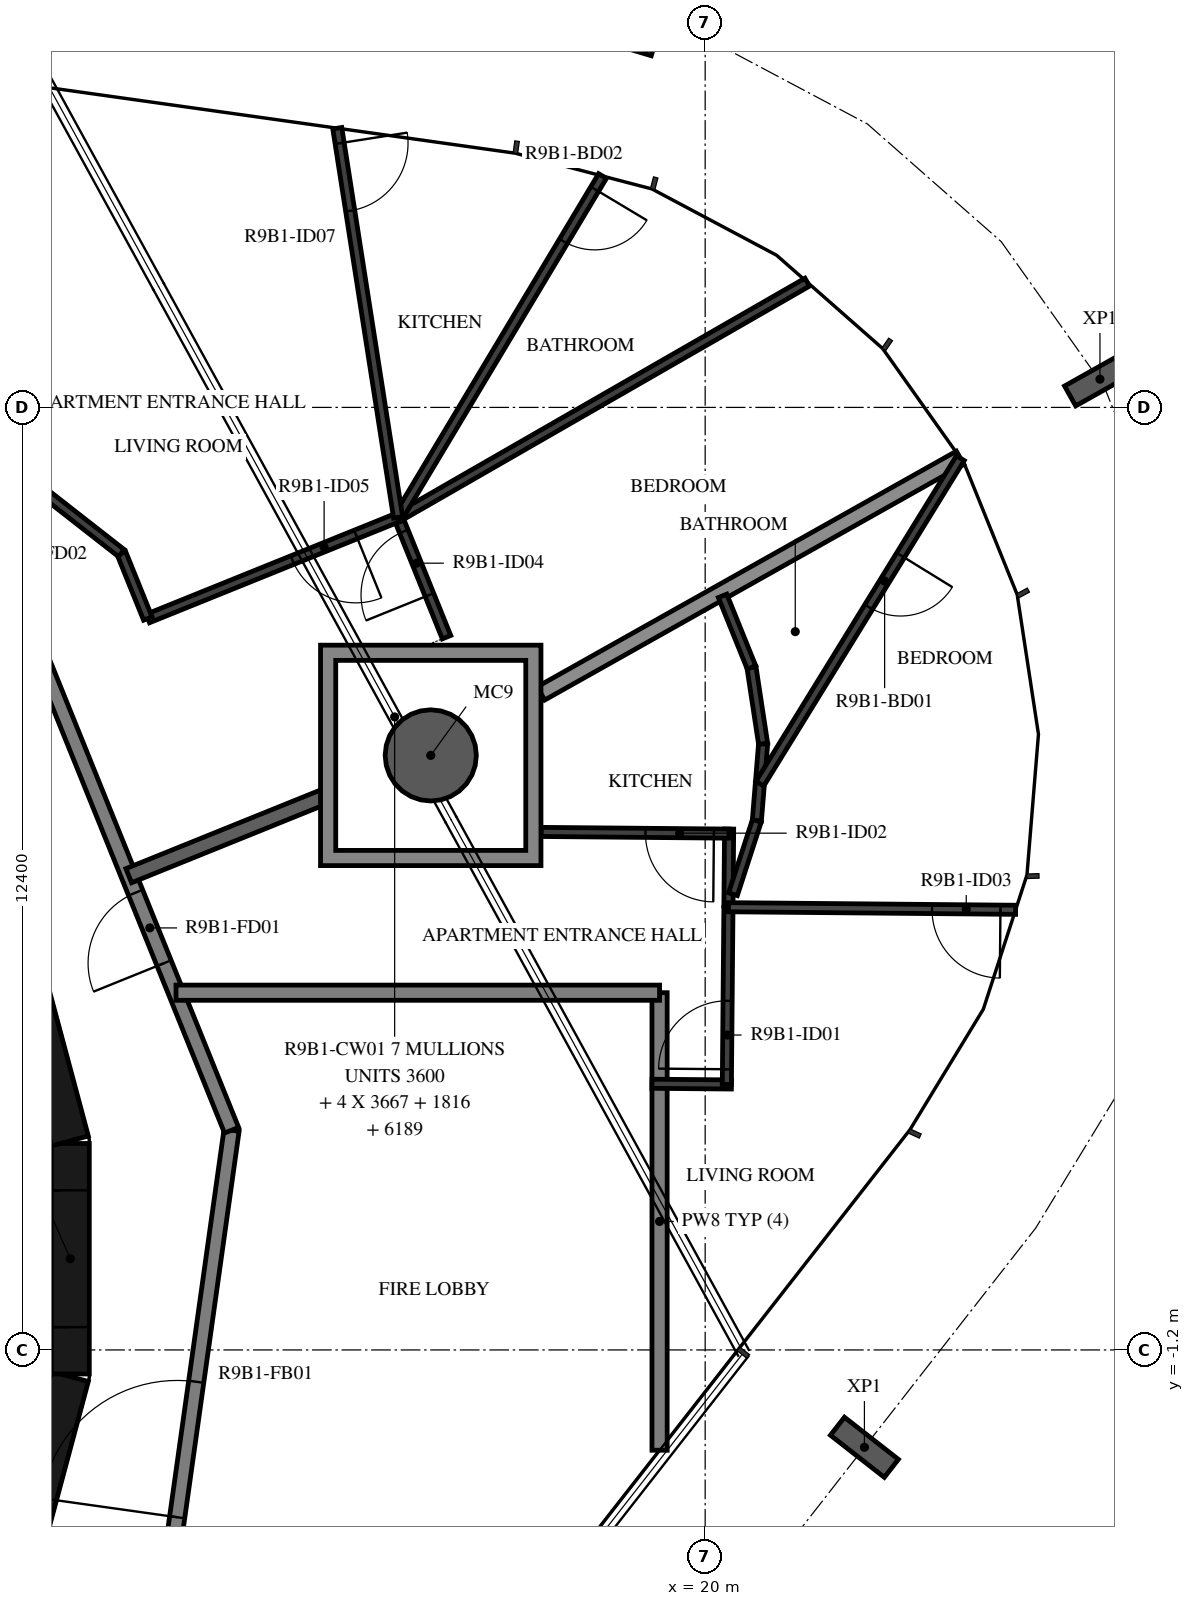
"""IFC4 building model, lengths in metres.
Left out: names, types, materials, properties, quantities, classifications, styles, units other than length and angle.
Written with IfcOpenShell. Run it as: python <this file> out.ifc"""

import sys

from ifc_helpers import new_model, si_unit, direction, frame, frame_2d, origin, origin_2d, place, context, subcontext, project, spatial, polyline, rectangle, hollow_circle, i_section, outline, extrude, element, fill, save


model = new_model("IFC4")
c1 = context("Model", 3, precision=1e-05, world=origin(), true_north=direction((0.0, 1.0)))
c2 = subcontext(c1, "Body", "Model", "MODEL_VIEW")
j1 = project(units=[si_unit("LENGTHUNIT", "METRE"), si_unit("PLANEANGLEUNIT", "RADIAN")], contexts=[c1])
p1 = place(None, origin())
s1 = spatial("IfcSite", under=j1, at=p1, CompositionType="ELEMENT")
p2 = place(p1, origin())
s2 = spatial("IfcBuilding", under=s1, at=p2, CompositionType="ELEMENT")
p3 = place(p2, frame((0.0, 0.0, 343.5)))
s3 = spatial("IfcBuildingStorey", under=s2, at=p3, CompositionType="ELEMENT", Elevation=343.5)
p4 = place(p3, frame((16.39, 6.622, -0.38), z_axis=(0.0, 0.0, 1.0), x_axis=(1.0, 0.0, 0.0)))
e1 = element("IfcColumn", 1, at=p4, inside=s3, PredefinedType="COLUMN", context=c2, shape_type="SweptSolid", body=[
    extrude(hollow_circle(Radius=0.6, WallThickness=0.03, at=origin_2d()), origin(), (0.0, 0.0, 1.0), 3.5),
])
for number, where, z_axis, x_axis in (
    (2, (22.095, -2.481, -0.38), (0.0, 0.0, 1.0), (-0.616, -0.788, 0.0)),
    (3, (25.194, 11.571, -0.38), (0.0, 0.0, 1.0), (0.49, -0.872, 0.0)),
    (4, (19.276, 16.301, -0.38), (0.0, 0.0, 1.0), (0.958, -0.286, 0.0)),
):
    element("IfcColumn", number, at=place(p3, frame(where, z_axis=z_axis, x_axis=x_axis)), inside=s3, PredefinedType="COLUMN", context=c2, shape_type="SweptSolid", body=[
        extrude(i_section(OverallWidth=0.3, OverallDepth=0.9, WebThickness=0.019, FlangeThickness=0.035, FilletRadius=0.03, at=origin_2d()), origin(), (0.0, 0.0, 1.0), 3.5),
    ])
p5 = place(p3, frame((10.858, -4.479, 0.0), z_axis=(0.0, 0.0, 1.0), x_axis=(0.258734743916, 0.965948410781, 0.0)))
e5 = element("IfcWall", 5, at=p5, inside=s3, PredefinedType="SHEAR", context=c2, shape_type="SweptSolid", body=[
    extrude(rectangle(XDim=3.033, YDim=0.5, at=frame_2d((1.516, 0.0))), origin(), (0.0, 0.0, 1.0), 3.12),
])
p6 = place(p3, frame((11.647, -1.516, 0.0), z_axis=(0.0, 0.0, 1.0), x_axis=(0.0, 1.0, 0.0)))
e6 = element("IfcWall", 6, at=p6, inside=s3, PredefinedType="SHEAR", context=c2, shape_type="SweptSolid", body=[
    extrude(rectangle(XDim=3.033, YDim=0.5, at=frame_2d((1.516, 0.0))), origin(), (0.0, 0.0, 1.0), 3.12),
])
p7 = place(p6, frame((0.616, 0.0, 0.0)))
e7 = element("IfcOpeningElement", 7, at=p7, cuts=e6, PredefinedType="OPENING", context=c2, shape_type="SweptSolid", body=[
    extrude(rectangle(XDim=1.8, YDim=2.1, at=frame_2d((0.9, 1.05))), frame((0.0, 0.26, 0.0), z_axis=(0.0, -1.0, 0.0), x_axis=(1.0, 0.0, 0.0)), (0.0, 0.0, 1.0), 0.52),
])
p8 = place(p3, frame((11.643, 1.55, 0.0), z_axis=(0.0, 0.0, 1.0), x_axis=(-0.258734743916, 0.965948410781, 0.0)))
e8 = element("IfcWall", 8, at=p8, inside=s3, PredefinedType="SHEAR", context=c2, shape_type="SweptSolid", body=[
    extrude(rectangle(XDim=3.033, YDim=0.5, at=frame_2d((1.516, 0.0))), origin(), (0.0, 0.0, 1.0), 3.12),
])
p9 = place(p3, frame((12.77, -5.42, 0.0), z_axis=(0.0, 0.0, 1.0), x_axis=(0.139155334385, 0.990270565508, 0.0)))
e9 = element("IfcWall", 9, at=p9, inside=s3, PredefinedType="STANDARD", context=c2, shape_type="SweptSolid", body=[
    extrude(rectangle(XDim=7.181, YDim=0.2, at=frame_2d((3.59, 0.0))), origin(), (0.0, 0.0, 1.0), 3.12),
])
p10 = place(p9, frame((2.039, 0.0, 0.0)))
e10 = element("IfcOpeningElement", 10, at=p10, cuts=e9, PredefinedType="OPENING", context=c2, shape_type="SweptSolid", body=[
    extrude(rectangle(XDim=1.8, YDim=2.1, at=frame_2d((0.9, 1.05))), frame((0.0, 0.11, 0.0), z_axis=(0.0, -1.0, 0.0), x_axis=(1.0, 0.0, 0.0)), (0.0, 0.0, 1.0), 0.22),
])
p11 = place(p3, frame((13.769, 1.691, 0.0), z_axis=(0.0, 0.0, 1.0), x_axis=(-0.374618189599, 0.92717916932, 0.0)))
e11 = element("IfcWall", 11, at=p11, inside=s3, PredefinedType="STANDARD", context=c2, shape_type="SweptSolid", body=[
    extrude(rectangle(XDim=7.181, YDim=0.2, at=frame_2d((3.591, 0.0))), origin(), (0.0, 0.0, 1.0), 3.12),
])
p12 = place(p11, frame((2.371, 0.0, 0.0)))
e12 = element("IfcOpeningElement", 12, at=p12, cuts=e11, PredefinedType="OPENING", context=c2, shape_type="SweptSolid", body=[
    extrude(rectangle(XDim=1.0, YDim=2.1, at=frame_2d((0.5, 1.05))), frame((0.0, 0.11, 0.0), z_axis=(0.0, -1.0, 0.0), x_axis=(1.0, 0.0, 0.0)), (0.0, 0.0, 1.0), 0.22),
])
p13 = place(p3, frame((19.4, -2.519, 0.0), z_axis=(0.0, 0.0, 1.0), x_axis=(0.0, 1.0, 0.0)))
e13 = element("IfcWall", 13, at=p13, inside=s3, PredefinedType="STANDARD", context=c2, shape_type="SweptSolid", body=[
    extrude(rectangle(XDim=6.019, YDim=0.2, at=frame_2d((3.01, 0.0))), origin(), (0.0, 0.0, 1.0), 3.12),
])
p14 = place(p3, frame((19.4, 3.5, 0.0), z_axis=(0.0, 0.0, 1.0), x_axis=(-1.0, 0.0, 0.0)))
e14 = element("IfcWall", 14, at=p14, inside=s3, PredefinedType="STANDARD", context=c2, shape_type="SweptSolid", body=[
    extrude(rectangle(XDim=6.362, YDim=0.2, at=frame_2d((3.181, 0.0))), origin(), (0.0, 0.0, 1.0), 3.12),
])
p15 = place(p3, frame((14.989, 6.079, 0.0), z_axis=(0.0, 0.0, 1.0), x_axis=(-0.927203056473, -0.374559063523, 0.0)))
e15 = element("IfcWall", 15, at=p15, inside=s3, PredefinedType="STANDARD", context=c2, shape_type="SweptSolid", body=[
    extrude(rectangle(XDim=2.775, YDim=0.2, at=frame_2d((1.387, 0.0))), origin(), (0.0, 0.0, 1.0), 3.12),
])
p16 = place(p3, frame((23.354, 10.537, 0.0), z_axis=(0.0, 0.0, 1.0), x_axis=(-0.871719790551, -0.490004700754, 0.0)))
e16 = element("IfcWall", 16, at=p16, inside=s3, PredefinedType="STANDARD", context=c2, shape_type="SweptSolid", body=[
    extrude(rectangle(XDim=6.326, YDim=0.2, at=frame_2d((3.163, 0.0))), origin(), (0.0, 0.0, 1.0), 2.73),
])
p17 = place(p3, frame((19.3, 2.302, 0.0), z_axis=(0.0, 0.0, 1.0), x_axis=(0.999958506341, -0.009109643015, 0.0)))
e17 = element("IfcWall", 17, at=p17, inside=s3, PredefinedType="PARTITIONING", context=c2, shape_type="SweptSolid", body=[
    extrude(rectangle(XDim=1.045, YDim=0.12, at=frame_2d((0.522, 0.0))), origin(), (0.0, 0.0, 1.0), 3.12),
])
p18 = place(p3, frame((20.285, 2.293, 0.0), z_axis=(0.0, 0.0, 1.0), x_axis=(0.008900171034, 0.999960392693, 0.0)))
e18 = element("IfcWall", 18, at=p18, inside=s3, PredefinedType="PARTITIONING", context=c2, shape_type="SweptSolid", body=[
    extrude(rectangle(XDim=2.332, YDim=0.12, at=frame_2d((1.166, 0.0))), origin(), (0.0, 0.0, 1.0), 3.12),
])
p19 = place(p18, frame((0.2, 0.0, 0.0)))
e19 = element("IfcOpeningElement", 19, at=p19, cuts=e18, PredefinedType="OPENING", context=c2, shape_type="SweptSolid", body=[
    extrude(rectangle(XDim=0.9, YDim=2.1, at=frame_2d((0.45, 1.05))), frame((0.0, 0.07, 0.0), z_axis=(0.0, -1.0, 0.0), x_axis=(1.0, 0.0, 0.0)), (0.0, 0.0, 1.0), 0.14),
])
p20 = place(p3, frame((20.306, 4.639, 0.0), z_axis=(0.0, 0.0, 1.0), x_axis=(0.008906724211, 0.999960334345, 0.0)))
e20 = element("IfcWall", 20, at=p20, inside=s3, PredefinedType="PARTITIONING", context=c2, shape_type="SweptSolid", body=[
    extrude(rectangle(XDim=1.014, YDim=0.12, at=frame_2d((0.507, 0.0))), origin(), (0.0, 0.0, 1.0), 3.12),
])
p21 = place(p3, frame((20.315, 5.593, 0.0), z_axis=(0.0, 0.0, 1.0), x_axis=(-0.999960597409, 0.008877140833, 0.0)))
e21 = element("IfcWall", 21, at=p21, inside=s3, PredefinedType="PARTITIONING", context=c2, shape_type="SweptSolid", body=[
    extrude(rectangle(XDim=2.475, YDim=0.12, at=frame_2d((1.238, 0.0))), origin(), (0.0, 0.0, 1.0), 3.12),
])
p22 = place(p21, frame((0.2, 0.0, 0.0)))
e22 = element("IfcOpeningElement", 22, at=p22, cuts=e21, PredefinedType="OPENING", context=c2, shape_type="SweptSolid", body=[
    extrude(rectangle(XDim=0.9, YDim=2.1, at=frame_2d((0.45, 1.05))), frame((0.0, 0.07, 0.0), z_axis=(0.0, -1.0, 0.0), x_axis=(1.0, 0.0, 0.0)), (0.0, 0.0, 1.0), 0.14),
])
p23 = place(p3, frame((24.085, 4.591, 0.0), z_axis=(0.0, 0.0, 1.0), x_axis=(-0.99996025077, 0.008916102255, 0.0)))
e23 = element("IfcWall", 23, at=p23, inside=s3, PredefinedType="PARTITIONING", context=c2, shape_type="SweptSolid", body=[
    extrude(rectangle(XDim=3.779, YDim=0.12, at=frame_2d((1.889, 0.0))), origin(), (0.0, 0.0, 1.0), 2.73),
])
p24 = place(p23, frame((0.2, 0.0, 0.0)))
e24 = element("IfcOpeningElement", 24, at=p24, cuts=e23, PredefinedType="OPENING", context=c2, shape_type="SweptSolid", body=[
    extrude(rectangle(XDim=0.9, YDim=2.1, at=frame_2d((0.45, 1.05))), frame((0.0, 0.07, 0.0), z_axis=(0.0, -1.0, 0.0), x_axis=(1.0, 0.0, 0.0)), (0.0, 0.0, 1.0), 0.14),
])
p25 = place(p3, frame((20.762, 6.775, 0.0), z_axis=(0.0, 0.0, 1.0), x_axis=(-0.08121587, -0.996696534789, 0.0)))
e25 = element("IfcWall", 25, at=p25, inside=s3, PredefinedType="PARTITIONING", context=c2, shape_type="SweptSolid", body=[
    extrude(rectangle(XDim=1.016, YDim=0.12, at=frame_2d((0.508, 0.0))), origin(), (0.0, 0.0, 1.0), 3.12),
])
p26 = place(p3, frame((20.68, 5.762, 0.0), z_axis=(0.0, 0.0, 1.0), x_axis=(-0.30908063779, -0.951035834942, 0.0)))
e26 = element("IfcWall", 26, at=p26, inside=s3, PredefinedType="PARTITIONING", context=c2, shape_type="SweptSolid", body=[
    extrude(rectangle(XDim=1.016, YDim=0.12, at=frame_2d((0.508, 0.0))), origin(), (0.0, 0.0, 1.0), 3.12),
])
p27 = place(p3, frame((23.357, 10.532, 0.0), z_axis=(0.0, 0.0, 1.0), x_axis=(-0.524476563806, -0.851424884542, 0.0)))
e27 = element("IfcWall", 27, at=p27, inside=s3, PredefinedType="PARTITIONING", context=c2, shape_type="SweptSolid", body=[
    extrude(rectangle(XDim=5.029, YDim=0.12, at=frame_2d((2.515, 0.0))), origin(), (0.0, 0.0, 1.0), 3.12),
])
p28 = place(p27, frame((1.5, 0.0, 0.0)))
e28 = element("IfcOpeningElement", 28, at=p28, cuts=e27, PredefinedType="OPENING", context=c2, shape_type="SweptSolid", body=[
    extrude(rectangle(XDim=0.8, YDim=2.1, at=frame_2d((0.4, 1.05))), frame((0.0, 0.07, 0.0), z_axis=(0.0, -1.0, 0.0), x_axis=(1.0, 0.0, 0.0)), (0.0, 0.0, 1.0), 0.14),
])
p29 = place(p3, frame((20.762, 6.775, 0.0), z_axis=(0.0, 0.0, 1.0), x_axis=(-0.150702440861, 0.988579169474, 0.0)))
e29 = element("IfcWall", 29, at=p29, inside=s3, PredefinedType="PARTITIONING", context=c2, shape_type="SweptSolid", body=[
    extrude(rectangle(XDim=1.016, YDim=0.12, at=frame_2d((0.508, 0.0))), origin(), (0.0, 0.0, 1.0), 3.12),
])
p30 = place(p3, frame((20.609, 7.779, 0.0), z_axis=(0.0, 0.0, 1.0), x_axis=(-0.374371668856, 0.927278735633, 0.0)))
e30 = element("IfcWall", 30, at=p30, inside=s3, PredefinedType="PARTITIONING", context=c2, shape_type="SweptSolid", body=[
    extrude(rectangle(XDim=1.016, YDim=0.12, at=frame_2d((0.508, 0.0))), origin(), (0.0, 0.0, 1.0), 3.12),
])
p31 = place(p3, frame((16.597, 8.177, 0.0), z_axis=(0.0, 0.0, 1.0), x_axis=(-0.374631609957, 0.927173746835, 0.0)))
e31 = element("IfcWall", 31, at=p31, inside=s3, PredefinedType="PARTITIONING", context=c2, shape_type="SweptSolid", body=[
    extrude(rectangle(XDim=1.7, YDim=0.12, at=frame_2d((0.85, 0.0))), origin(), (0.0, 0.0, 1.0), 3.12),
])
p32 = place(p31, frame((0.6, 0.0, 0.0)))
e32 = element("IfcOpeningElement", 32, at=p32, cuts=e31, PredefinedType="OPENING", context=c2, shape_type="SweptSolid", body=[
    extrude(rectangle(XDim=0.9, YDim=2.1, at=frame_2d((0.45, 1.05))), frame((0.0, 0.07, 0.0), z_axis=(0.0, -1.0, 0.0), x_axis=(1.0, 0.0, 0.0)), (0.0, 0.0, 1.0), 0.14),
])
p33 = place(p3, frame((15.96, 9.753, 0.0), z_axis=(0.0, 0.0, 1.0), x_axis=(-0.927148174805, -0.37469489182, 0.0)))
e33 = element("IfcWall", 33, at=p33, inside=s3, PredefinedType="PARTITIONING", context=c2, shape_type="SweptSolid", body=[
    extrude(rectangle(XDim=3.552, YDim=0.12, at=frame_2d((1.776, 0.0))), origin(), (0.0, 0.0, 1.0), 3.12),
])
p34 = place(p33, frame((0.6, 0.0, 0.0)))
e34 = element("IfcOpeningElement", 34, at=p34, cuts=e33, PredefinedType="OPENING", context=c2, shape_type="SweptSolid", body=[
    extrude(rectangle(XDim=0.9, YDim=2.1, at=frame_2d((0.45, 1.05))), frame((0.0, 0.07, 0.0), z_axis=(0.0, -1.0, 0.0), x_axis=(1.0, 0.0, 0.0)), (0.0, 0.0, 1.0), 0.14),
])
p35 = place(p3, frame((12.667, 8.423, 0.0), z_axis=(0.0, 0.0, 1.0), x_axis=(-0.374697807675, 0.927146996395, 0.0)))
e35 = element("IfcWall", 35, at=p35, inside=s3, PredefinedType="PARTITIONING", context=c2, shape_type="SweptSolid", body=[
    extrude(rectangle(XDim=0.928, YDim=0.12, at=frame_2d((0.464, 0.0))), origin(), (0.0, 0.0, 1.0), 3.12),
])
p36 = place(p3, frame((12.319, 9.283, 0.0), z_axis=(0.0, 0.0, 1.0), x_axis=(-0.788000268464, 0.61567489546, 0.0)))
e36 = element("IfcWall", 36, at=p36, inside=s3, PredefinedType="PARTITIONING", context=c2, shape_type="SweptSolid", body=[
    extrude(rectangle(XDim=7.985, YDim=0.12, at=frame_2d((3.992, 0.0))), origin(), (0.0, 0.0, 1.0), 3.12),
])
p37 = place(p36, frame((4.765, 0.0, 0.0)))
e37 = element("IfcOpeningElement", 37, at=p37, cuts=e36, PredefinedType="OPENING", context=c2, shape_type="SweptSolid", body=[
    extrude(rectangle(XDim=0.9, YDim=2.1, at=frame_2d((0.45, 1.05))), frame((0.0, 0.07, 0.0), z_axis=(0.0, -1.0, 0.0), x_axis=(1.0, 0.0, 0.0)), (0.0, 0.0, 1.0), 0.14),
])
p38 = place(p3, frame((21.343, 12.847, 0.0), z_axis=(0.0, 0.0, 1.0), x_axis=(-0.866974691568, -0.498352168832, 0.0)))
e38 = element("IfcWall", 38, at=p38, inside=s3, PredefinedType="PARTITIONING", context=c2, shape_type="SweptSolid", body=[
    extrude(rectangle(XDim=6.208, YDim=0.12, at=frame_2d((3.104, 0.0))), origin(), (0.0, 0.0, 1.0), 3.12),
])
p39 = place(p3, frame((18.649, 14.244, 0.0), z_axis=(0.0, 0.0, 1.0), x_axis=(-0.513782200586, -0.85792065505, 0.0)))
e39 = element("IfcWall", 39, at=p39, inside=s3, PredefinedType="PARTITIONING", context=c2, shape_type="SweptSolid", body=[
    extrude(rectangle(XDim=5.234, YDim=0.12, at=frame_2d((2.617, 0.0))), origin(), (0.0, 0.0, 1.0), 3.12),
])
p40 = place(p39, frame((0.2, 0.0, 0.0)))
e40 = element("IfcOpeningElement", 40, at=p40, cuts=e39, PredefinedType="OPENING", context=c2, shape_type="SweptSolid", body=[
    extrude(rectangle(XDim=0.8, YDim=2.1, at=frame_2d((0.4, 1.05))), frame((0.0, 0.07, 0.0), z_axis=(0.0, -1.0, 0.0), x_axis=(1.0, 0.0, 0.0)), (0.0, 0.0, 1.0), 0.14),
])
p41 = place(p3, frame((15.16, 14.873, 0.0), z_axis=(0.0, 0.0, 1.0), x_axis=(0.154389815045, -0.988010012606, 0.0)))
e41 = element("IfcWall", 41, at=p41, inside=s3, PredefinedType="PARTITIONING", context=c2, shape_type="SweptSolid", body=[
    extrude(rectangle(XDim=5.182, YDim=0.12, at=frame_2d((2.591, 0.0))), origin(), (0.0, 0.0, 1.0), 3.12),
])
p42 = place(p41, frame((0.2, 0.0, 0.0)))
e42 = element("IfcOpeningElement", 42, at=p42, cuts=e41, PredefinedType="OPENING", context=c2, shape_type="SweptSolid", body=[
    extrude(rectangle(XDim=0.9, YDim=2.1, at=frame_2d((0.45, 1.05))), frame((0.0, 0.07, 0.0), z_axis=(0.0, -1.0, 0.0), x_axis=(1.0, 0.0, 0.0)), (0.0, 0.0, 1.0), 0.14),
])
p43 = place(p3, origin())
e43 = element("IfcWall", 43, at=p43, inside=s3, PredefinedType="STANDARD", context=c2, shape_type="SweptSolid", body=[
    extrude(outline(polyline([(17.84, 8.072), (17.84, 5.172), (14.94, 5.172), (14.94, 8.072), (17.84, 8.072)]), holes=[polyline([(15.14, 5.372), (17.64, 5.372), (17.64, 7.872), (15.14, 7.872), (15.14, 5.372)])]), origin(), (0.0, 0.0, 1.0), 3.12),
])
p44 = place(p7, origin())
e44 = element("IfcDoor", 44, at=p44, inside=s3, OperationType="DOUBLE_DOOR_SINGLE_SWING", PredefinedType="DOOR", context=c2, shape_type="SweptSolid", body=[
    extrude(rectangle(XDim=1.8, YDim=2.1, at=frame_2d((0.9, 1.05))), frame((0.0, 0.025, 0.0), z_axis=(0.0, -1.0, 0.0), x_axis=(1.0, 0.0, 0.0)), (0.0, 0.0, 1.0), 0.05),
])
fill(e7, e44)
p45 = place(p12, origin())
e45 = element("IfcDoor", 45, at=p45, inside=s3, OperationType="SINGLE_SWING_LEFT", PredefinedType="DOOR", context=c2, shape_type="SweptSolid", body=[
    extrude(rectangle(XDim=1.0, YDim=2.1, at=frame_2d((0.5, 1.05))), frame((0.0, 0.025, 0.0), z_axis=(0.0, -1.0, 0.0), x_axis=(1.0, 0.0, 0.0)), (0.0, 0.0, 1.0), 0.05),
])
fill(e12, e45)
p46 = place(p19, origin())
e46 = element("IfcDoor", 46, at=p46, inside=s3, OperationType="SINGLE_SWING_RIGHT", PredefinedType="DOOR", context=c2, shape_type="SweptSolid", body=[
    extrude(rectangle(XDim=0.9, YDim=2.1, at=frame_2d((0.45, 1.05))), frame((0.0, 0.025, 0.0), z_axis=(0.0, -1.0, 0.0), x_axis=(1.0, 0.0, 0.0)), (0.0, 0.0, 1.0), 0.05),
])
fill(e19, e46)
p47 = place(p22, origin())
e47 = element("IfcDoor", 47, at=p47, inside=s3, OperationType="SINGLE_SWING_RIGHT", PredefinedType="DOOR", context=c2, shape_type="SweptSolid", body=[
    extrude(rectangle(XDim=0.9, YDim=2.1, at=frame_2d((0.45, 1.05))), frame((0.0, 0.025, 0.0), z_axis=(0.0, -1.0, 0.0), x_axis=(1.0, 0.0, 0.0)), (0.0, 0.0, 1.0), 0.05),
])
fill(e22, e47)
p48 = place(p24, origin())
e48 = element("IfcDoor", 48, at=p48, inside=s3, OperationType="SINGLE_SWING_RIGHT", PredefinedType="DOOR", context=c2, shape_type="SweptSolid", body=[
    extrude(rectangle(XDim=0.9, YDim=2.1, at=frame_2d((0.45, 1.05))), frame((0.0, 0.025, 0.0), z_axis=(0.0, -1.0, 0.0), x_axis=(1.0, 0.0, 0.0)), (0.0, 0.0, 1.0), 0.05),
])
fill(e24, e48)
p49 = place(p28, origin())
e49 = element("IfcDoor", 49, at=p49, inside=s3, OperationType="SINGLE_SWING_RIGHT", PredefinedType="DOOR", context=c2, shape_type="SweptSolid", body=[
    extrude(rectangle(XDim=0.8, YDim=2.1, at=frame_2d((0.4, 1.05))), frame((0.0, 0.025, 0.0), z_axis=(0.0, -1.0, 0.0), x_axis=(1.0, 0.0, 0.0)), (0.0, 0.0, 1.0), 0.05),
])
fill(e28, e49)
p50 = place(p32, origin())
e50 = element("IfcDoor", 50, at=p50, inside=s3, OperationType="SINGLE_SWING_LEFT", PredefinedType="DOOR", context=c2, shape_type="SweptSolid", body=[
    extrude(rectangle(XDim=0.9, YDim=2.1, at=frame_2d((0.45, 1.05))), frame((0.0, 0.025, 0.0), z_axis=(0.0, -1.0, 0.0), x_axis=(1.0, 0.0, 0.0)), (0.0, 0.0, 1.0), 0.05),
])
fill(e32, e50)
p51 = place(p34, origin())
e51 = element("IfcDoor", 51, at=p51, inside=s3, OperationType="SINGLE_SWING_RIGHT", PredefinedType="DOOR", context=c2, shape_type="SweptSolid", body=[
    extrude(rectangle(XDim=0.9, YDim=2.1, at=frame_2d((0.45, 1.05))), frame((0.0, 0.025, 0.0), z_axis=(0.0, -1.0, 0.0), x_axis=(1.0, 0.0, 0.0)), (0.0, 0.0, 1.0), 0.05),
])
fill(e34, e51)
p52 = place(p42, origin())
e52 = element("IfcDoor", 52, at=p52, inside=s3, OperationType="SINGLE_SWING_LEFT", PredefinedType="DOOR", context=c2, shape_type="SweptSolid", body=[
    extrude(rectangle(XDim=0.9, YDim=2.1, at=frame_2d((0.45, 1.05))), frame((0.0, 0.025, 0.0), z_axis=(0.0, -1.0, 0.0), x_axis=(1.0, 0.0, 0.0)), (0.0, 0.0, 1.0), 0.05),
])
fill(e42, e52)
p53 = place(p40, origin())
e53 = element("IfcDoor", 53, at=p53, inside=s3, OperationType="SINGLE_SWING_LEFT", PredefinedType="DOOR", context=c2, shape_type="SweptSolid", body=[
    extrude(rectangle(XDim=0.8, YDim=2.1, at=frame_2d((0.4, 1.05))), frame((0.0, 0.025, 0.0), z_axis=(0.0, -1.0, 0.0), x_axis=(1.0, 0.0, 0.0)), (0.0, 0.0, 1.0), 0.05),
])
fill(e40, e53)
p54 = place(p10, origin())
e54 = element("IfcDoor", 54, at=p54, inside=s3, OperationType="DOUBLE_DOOR_SINGLE_SWING", PredefinedType="DOOR", context=c2, shape_type="SweptSolid", body=[
    extrude(rectangle(XDim=1.8, YDim=2.1, at=frame_2d((0.9, 1.05))), frame((0.0, 0.025, 0.0), z_axis=(0.0, -1.0, 0.0), x_axis=(1.0, 0.0, 0.0)), (0.0, 0.0, 1.0), 0.05),
])
fill(e10, e54)
save(model, sys.argv[1])
